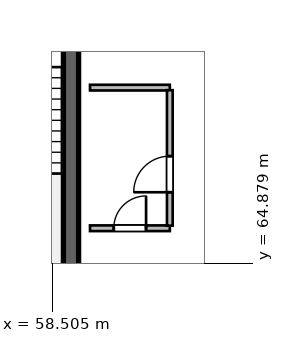
"""IFC4 building model, lengths in metres.
Left out: names, types, materials, properties, quantities, classifications, styles, units other than length and angle.
Written with IfcOpenShell. Run it as: python <this file> out.ifc"""

import sys

from ifc_helpers import new_model, si_unit, direction, frame, frame_2d, origin, place, context, subcontext, project, spatial, rectangle, extrude, source, transform, mapped, element, fill, save


model = new_model("IFC4")
c1 = context("Model", 3, precision=1e-05, world=origin(), true_north=direction((0.0, 1.0)))
c2 = subcontext(c1, "Body", "Model", "MODEL_VIEW")
j1 = project(units=[si_unit("LENGTHUNIT", "METRE"), si_unit("PLANEANGLEUNIT", "RADIAN")], contexts=[c1])
p1 = place(None, origin())
s1 = spatial("IfcSite", under=j1, at=p1, CompositionType="ELEMENT")
p2 = place(p1, origin())
s2 = spatial("IfcBuilding", under=s1, at=p2, CompositionType="ELEMENT")
p3 = place(p2, frame((0.0, 0.0, 275.7)))
s3 = spatial("IfcBuildingStorey", under=s2, at=p3, CompositionType="ELEMENT", Elevation=275.7)
m1 = source(origin(), c2, "Body", "SweptSolid", [
    extrude(rectangle(XDim=12.0, YDim=0.4, at=frame_2d((6.0, 0.0))), origin(), (0.0, 0.0, 1.0), 3.9),
])
p4 = place(p3, frame((59.0, 60.2, 0.0), z_axis=(0.0, 0.0, 1.0), x_axis=(0.0, 1.0, 0.0)))
e1 = element("IfcWall", 1, at=p4, inside=s3, PredefinedType="SHEAR", context=c2, shape_type="MappedRepresentation", body=[
    mapped(m1, transform((0.0, 0.0, 0.0), scale=1.0)),
])
m2 = source(origin(), c2, "Body", "SweptSolid", [
    extrude(rectangle(XDim=2.1, YDim=0.15, at=frame_2d((1.05, 0.0))), origin(), (0.0, 0.0, 1.0), 3.64),
])
p5 = place(p3, frame((59.5, 65.8, 0.0), z_axis=(0.0, 0.0, 1.0), x_axis=(1.0, 0.0, 0.0)))
e2 = element("IfcWall", 2, at=p5, inside=s3, PredefinedType="PARTITIONING", context=c2, shape_type="MappedRepresentation", body=[
    mapped(m2, transform((0.0, 0.0, 0.0), scale=1.0)),
])
p6 = place(p5, frame((0.625, 0.0, 0.0)))
e3 = element("IfcOpeningElement", 3, at=p6, cuts=e2, PredefinedType="OPENING", context=c2, shape_type="SweptSolid", body=[
    extrude(rectangle(XDim=0.85, YDim=2.1, at=frame_2d((0.425, 1.05))), frame((0.0, 0.085, 0.0), z_axis=(0.0, -1.0, 0.0), x_axis=(1.0, 0.0, 0.0)), (0.0, 0.0, 1.0), 0.17),
])
p7 = place(p3, frame((59.5, 69.5, 0.0), z_axis=(0.0, 0.0, 1.0), x_axis=(1.0, 0.0, 0.0)))
e4 = element("IfcWall", 4, at=p7, inside=s3, PredefinedType="PARTITIONING", context=c2, shape_type="MappedRepresentation", body=[
    mapped(m2, transform((0.0, 0.0, 0.0), scale=1.0)),
])
m3 = source(origin(), c2, "Body", "SweptSolid", [
    extrude(rectangle(XDim=3.565, YDim=0.15, at=frame_2d((1.783, 0.0))), origin(), (0.0, 0.0, 1.0), 3.64),
])
p8 = place(p3, frame((61.6, 65.867, 0.0), z_axis=(0.0, 0.0, 1.0), x_axis=(0.0, 1.0, 0.0)))
e5 = element("IfcWall", 5, at=p8, inside=s3, PredefinedType="PARTITIONING", context=c2, shape_type="MappedRepresentation", body=[
    mapped(m3, transform((0.0, 0.0, 0.0), scale=1.0)),
])
p9 = place(p8, frame((0.88, 0.0, 0.0)))
e6 = element("IfcOpeningElement", 6, at=p9, cuts=e5, PredefinedType="OPENING", context=c2, shape_type="SweptSolid", body=[
    extrude(rectangle(XDim=0.95, YDim=2.1, at=frame_2d((0.475, 1.05))), frame((0.0, 0.085, 0.0), z_axis=(0.0, -1.0, 0.0), x_axis=(1.0, 0.0, 0.0)), (0.0, 0.0, 1.0), 0.17),
])
m4 = source(origin(), c2, "Body", "SweptSolid", [
    extrude(rectangle(XDim=0.85, YDim=2.1, at=frame_2d((0.425, 1.05))), frame((0.0, 0.025, 0.0), z_axis=(0.0, -1.0, 0.0), x_axis=(1.0, 0.0, 0.0)), (0.0, 0.0, 1.0), 0.05),
])
p10 = place(p6, origin())
e7 = element("IfcDoor", 7, at=p10, inside=s3, OperationType="SINGLE_SWING_RIGHT", PredefinedType="DOOR", context=c2, shape_type="MappedRepresentation", body=[
    mapped(m4, transform((0.0, 0.0, 0.0), scale=1.0)),
])
fill(e3, e7)
m5 = source(origin(), c2, "Body", "SweptSolid", [
    extrude(rectangle(XDim=0.95, YDim=2.1, at=frame_2d((0.475, 1.05))), frame((0.0, 0.025, 0.0), z_axis=(0.0, -1.0, 0.0), x_axis=(1.0, 0.0, 0.0)), (0.0, 0.0, 1.0), 0.05),
])
p11 = place(p9, origin())
e8 = element("IfcDoor", 8, at=p11, inside=s3, OperationType="SINGLE_SWING_LEFT", PredefinedType="DOOR", context=c2, shape_type="MappedRepresentation", body=[
    mapped(m5, transform((0.0, 0.0, 0.0), scale=1.0)),
])
fill(e6, e8)
save(model, sys.argv[1])
